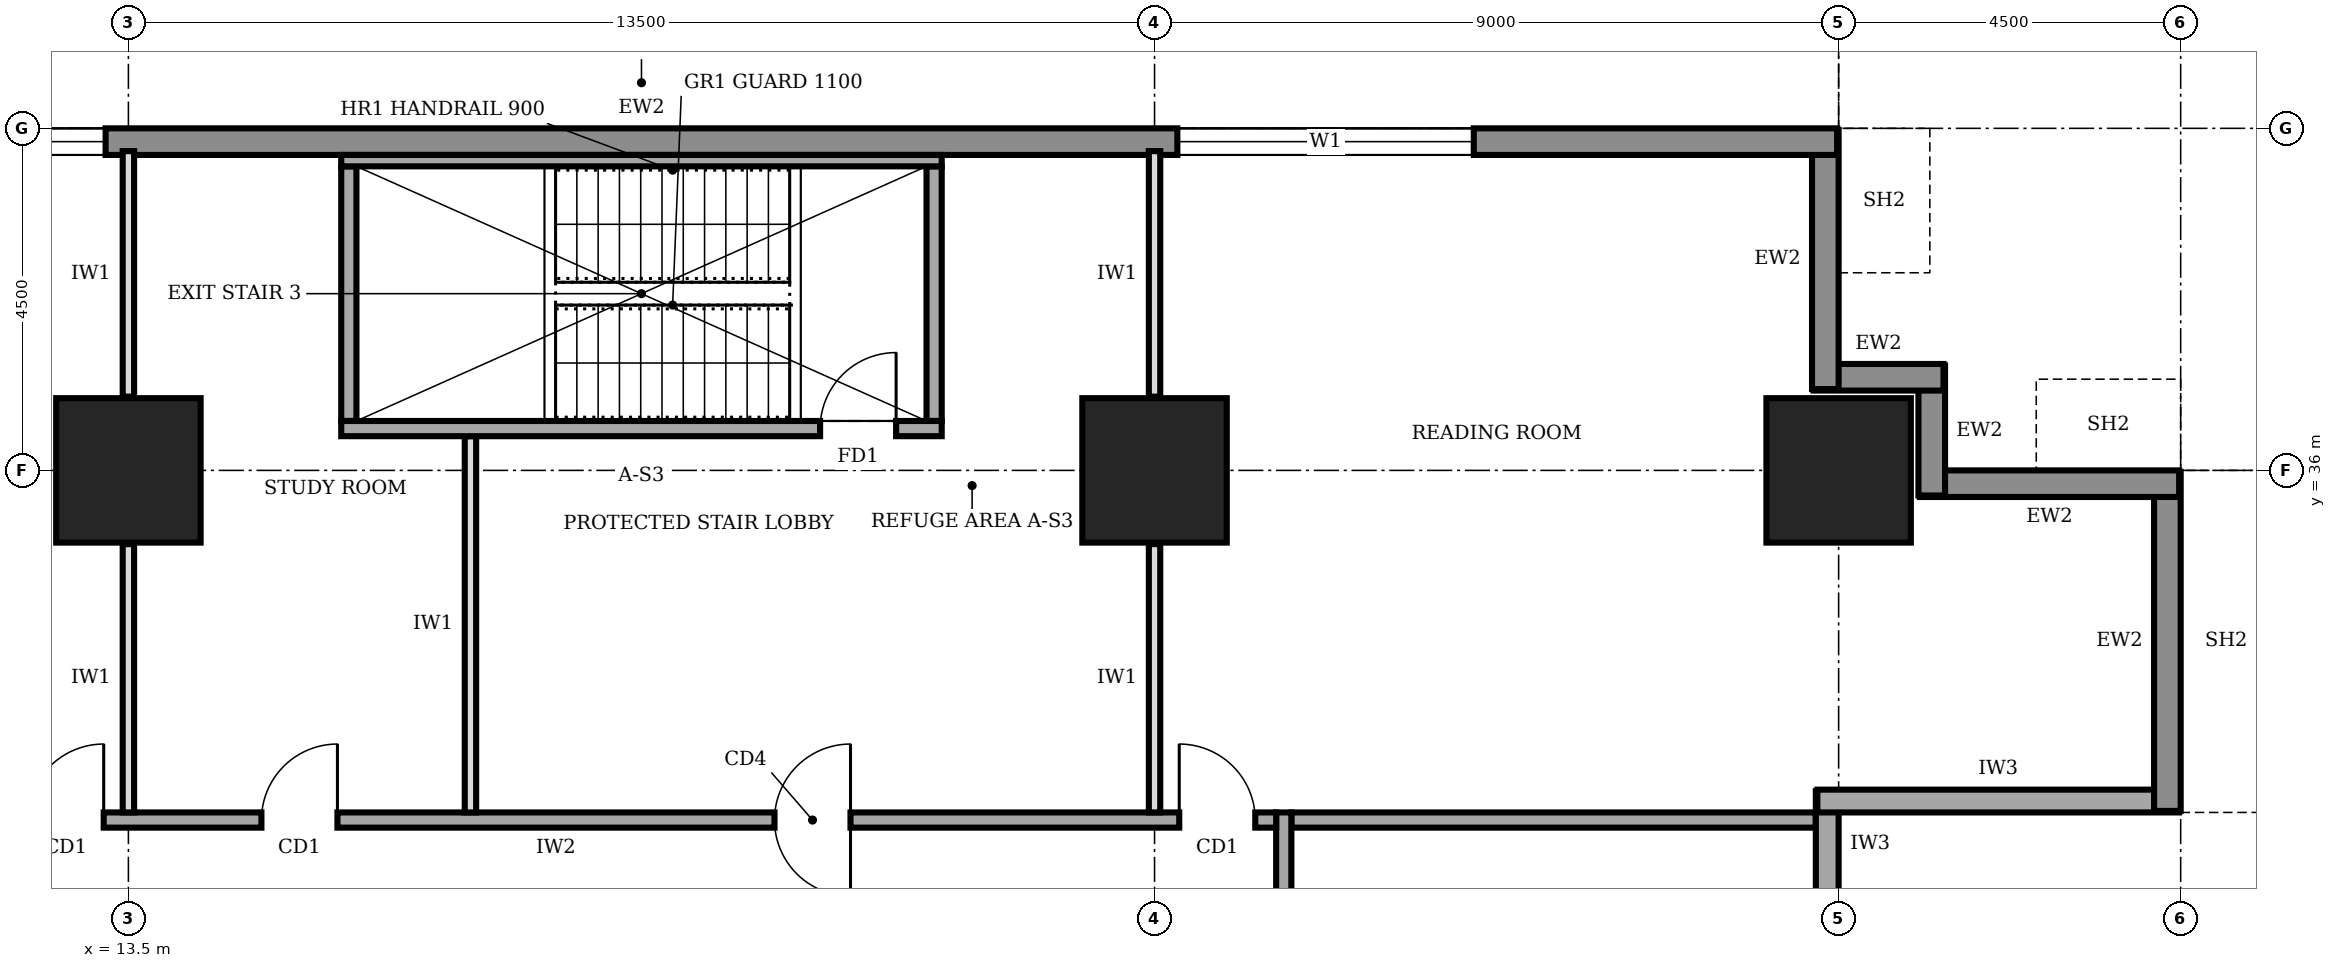
"""IFC4 building model, lengths in metres.
Left out: names, types, materials, properties, quantities, classifications, styles, units other than length and angle.
Written with IfcOpenShell. Run it as: python <this file> out.ifc"""

import sys

from ifc_helpers import new_model, si_unit, direction, frame, frame_2d, origin, origin_2d, place, context, subcontext, project, spatial, rectangle, extrude, element, fill, save


model = new_model("IFC4")
c1 = context("Model", 3, precision=1e-05, world=origin(), true_north=direction((0.0, 1.0)))
c2 = subcontext(c1, "Body", "Model", "MODEL_VIEW")
j1 = project(units=[si_unit("LENGTHUNIT", "METRE"), si_unit("PLANEANGLEUNIT", "RADIAN")], contexts=[c1])
p1 = place(None, origin())
s1 = spatial("IfcSite", under=j1, at=p1, CompositionType="ELEMENT")
p2 = place(p1, origin())
s2 = spatial("IfcBuilding", under=s1, at=p2, CompositionType="ELEMENT")
p3 = place(p2, frame((0.0, 0.0, 129.0)))
s3 = spatial("IfcBuildingStorey", under=s2, at=p3, CompositionType="ELEMENT", Elevation=129.0)
for number, where, z_axis, x_axis in (
    (1, (13.5, 36.0, 0.0), (0.0, 0.0, 1.0), (1.0, 0.0, 0.0)),
    (2, (27.0, 36.0, 0.0), (0.0, 0.0, 1.0), (1.0, 0.0, 0.0)),
    (3, (36.0, 36.0, 0.0), (0.0, 0.0, 1.0), (1.0, 0.0, 0.0)),
):
    element("IfcColumn", number, at=place(p3, frame(where, z_axis=z_axis, x_axis=x_axis)), inside=s3, PredefinedType="COLUMN", context=c2, shape_type="SweptSolid", body=[
        extrude(rectangle(XDim=1.9, YDim=1.9, at=origin_2d()), origin(), (0.0, 0.0, 1.0), 4.0),
    ])
p4 = place(p3, frame((35.85, 30.4, 0.0), z_axis=(0.0, 0.0, 1.0), x_axis=(0.0, 1.0, 0.0)))
e4 = element("IfcWall", 4, at=p4, inside=s3, PredefinedType="SOLIDWALL", context=c2, shape_type="SweptSolid", body=[
    extrude(rectangle(XDim=1.38, YDim=0.3, at=frame_2d((0.69, 0.0))), origin(), (0.0, 0.0, 1.0), 2.65),
])
p5 = place(p3, frame((35.72, 31.65, 0.0), z_axis=(0.0, 0.0, 1.0), x_axis=(1.0, 0.0, 0.0)))
e5 = element("IfcWall", 5, at=p5, inside=s3, PredefinedType="SOLIDWALL", context=c2, shape_type="SweptSolid", body=[
    extrude(rectangle(XDim=4.76, YDim=0.3, at=frame_2d((2.38, 0.0))), origin(), (0.0, 0.0, 1.0), 3.75),
])
p6 = place(p3, frame((40.325, 31.52, 0.0), z_axis=(0.0, 0.0, 1.0), x_axis=(0.0, 1.0, 0.0)))
e6 = element("IfcWall", 6, at=p6, inside=s3, PredefinedType="STANDARD", context=c2, shape_type="SweptSolid", body=[
    extrude(rectangle(XDim=4.46, YDim=0.35, at=frame_2d((2.23, 0.0))), origin(), (0.0, 0.0, 1.0), 3.75),
])
p7 = place(p3, frame((40.48, 35.825, 0.0), z_axis=(0.0, 0.0, 1.0), x_axis=(-1.0, 0.0, 0.0)))
e7 = element("IfcWall", 7, at=p7, inside=s3, PredefinedType="STANDARD", context=c2, shape_type="SweptSolid", body=[
    extrude(rectangle(XDim=3.41, YDim=0.35, at=frame_2d((1.705, 0.0))), origin(), (0.0, 0.0, 1.0), 2.85),
])
for number, where, z_axis, x_axis in (
    (8, (37.225, 35.67, 0.0), (0.0, 0.0, 1.0), (0.0, 1.0, 0.0)),
    (9, (37.38, 37.225, 0.0), (0.0, 0.0, 1.0), (-1.0, 0.0, 0.0)),
):
    element("IfcWall", number, at=place(p3, frame(where, z_axis=z_axis, x_axis=x_axis)), inside=s3, PredefinedType="STANDARD", context=c2, shape_type="SweptSolid", body=[
        extrude(rectangle(XDim=1.71, YDim=0.35, at=frame_2d((0.855, 0.0))), origin(), (0.0, 0.0, 1.0), 3.75),
    ])
p8 = place(p3, frame((35.825, 37.07, 0.0), z_axis=(0.0, 0.0, 1.0), x_axis=(0.0, 1.0, 0.0)))
e10 = element("IfcWall", 10, at=p8, inside=s3, PredefinedType="STANDARD", context=c2, shape_type="SweptSolid", body=[
    extrude(rectangle(XDim=3.41, YDim=0.35, at=frame_2d((1.705, 0.0))), origin(), (0.0, 0.0, 1.0), 2.85),
])
p9 = place(p3, frame((35.98, 40.325, 0.0), z_axis=(0.0, 0.0, 1.0), x_axis=(-1.0, 0.0, 0.0)))
e11 = element("IfcWall", 11, at=p9, inside=s3, PredefinedType="STANDARD", context=c2, shape_type="SweptSolid", body=[
    extrude(rectangle(XDim=31.46, YDim=0.35, at=frame_2d((15.73, 0.0))), origin(), (0.0, 0.0, 1.0), 3.75),
])
p10 = place(p9, frame((27.21, 0.0, 0.9)))
e12 = element("IfcOpeningElement", 12, at=p10, cuts=e11, PredefinedType="OPENING", context=c2, shape_type="SweptSolid", body=[
    extrude(rectangle(XDim=3.9, YDim=2.2, at=frame_2d((1.95, 1.1))), frame((0.0, 0.185, 0.0), z_axis=(0.0, -1.0, 0.0), x_axis=(1.0, 0.0, 0.0)), (0.0, 0.0, 1.0), 0.37),
])
p11 = place(p9, frame((22.78, 0.0, 0.9)))
e13 = element("IfcOpeningElement", 13, at=p11, cuts=e11, PredefinedType="OPENING", context=c2, shape_type="SweptSolid", body=[
    extrude(rectangle(XDim=3.9, YDim=2.2, at=frame_2d((1.95, 1.1))), frame((0.0, 0.185, 0.0), z_axis=(0.0, -1.0, 0.0), x_axis=(1.0, 0.0, 0.0)), (0.0, 0.0, 1.0), 0.37),
])
p12 = place(p9, frame((4.78, 0.0, 0.9)))
e14 = element("IfcOpeningElement", 14, at=p12, cuts=e11, PredefinedType="OPENING", context=c2, shape_type="SweptSolid", body=[
    extrude(rectangle(XDim=3.9, YDim=2.2, at=frame_2d((1.95, 1.1))), frame((0.0, 0.185, 0.0), z_axis=(0.0, -1.0, 0.0), x_axis=(1.0, 0.0, 0.0)), (0.0, 0.0, 1.0), 0.37),
])
p13 = place(p3, frame((28.7, 7.7, 0.0), z_axis=(0.0, 0.0, 1.0), x_axis=(0.0, 1.0, 0.0)))
e15 = element("IfcWall", 15, at=p13, inside=s3, PredefinedType="SOLIDWALL", context=c2, shape_type="SweptSolid", body=[
    extrude(rectangle(XDim=23.8, YDim=0.2, at=frame_2d((11.9, 0.0))), origin(), (0.0, 0.0, 1.0), 3.75),
])
p14 = place(p13, frame((10.9, 0.0, 0.0)))
e16 = element("IfcOpeningElement", 16, at=p14, cuts=e15, PredefinedType="OPENING", context=c2, shape_type="SweptSolid", body=[
    extrude(rectangle(XDim=1.8, YDim=2.1, at=frame_2d((0.9, 1.05))), frame((0.0, 0.11, 0.0), z_axis=(0.0, -1.0, 0.0), x_axis=(1.0, 0.0, 0.0)), (0.0, 0.0, 1.0), 0.22),
])
p15 = place(p3, frame((28.6, 31.4, 0.0), z_axis=(0.0, 0.0, 1.0), x_axis=(-1.0, 0.0, 0.0)))
e17 = element("IfcWall", 17, at=p15, inside=s3, PredefinedType="SOLIDWALL", context=c2, shape_type="SweptSolid", body=[
    extrude(rectangle(XDim=16.9, YDim=0.2, at=frame_2d((8.45, 0.0))), origin(), (0.0, 0.0, 1.0), 3.75),
])
p16 = place(p15, frame((15.425, 0.0, 0.0)))
e18 = element("IfcOpeningElement", 18, at=p16, cuts=e17, PredefinedType="OPENING", context=c2, shape_type="SweptSolid", body=[
    extrude(rectangle(XDim=1.0, YDim=2.1, at=frame_2d((0.5, 1.05))), frame((0.0, 0.11, 0.0), z_axis=(0.0, -1.0, 0.0), x_axis=(1.0, 0.0, 0.0)), (0.0, 0.0, 1.0), 0.22),
])
p17 = place(p15, frame((12.35, 0.0, 0.0)))
e19 = element("IfcOpeningElement", 19, at=p17, cuts=e17, PredefinedType="OPENING", context=c2, shape_type="SweptSolid", body=[
    extrude(rectangle(XDim=1.0, YDim=2.1, at=frame_2d((0.5, 1.05))), frame((0.0, 0.11, 0.0), z_axis=(0.0, -1.0, 0.0), x_axis=(1.0, 0.0, 0.0)), (0.0, 0.0, 1.0), 0.22),
])
p18 = place(p15, frame((5.6, 0.0, 0.0)))
e20 = element("IfcOpeningElement", 20, at=p18, cuts=e17, PredefinedType="OPENING", context=c2, shape_type="SweptSolid", body=[
    extrude(rectangle(XDim=1.0, YDim=2.1, at=frame_2d((0.5, 1.05))), frame((0.0, 0.11, 0.0), z_axis=(0.0, -1.0, 0.0), x_axis=(1.0, 0.0, 0.0)), (0.0, 0.0, 1.0), 0.22),
])
p19 = place(p15, frame((0.275, 0.0, 0.0)))
e21 = element("IfcOpeningElement", 21, at=p19, cuts=e17, PredefinedType="OPENING", context=c2, shape_type="SweptSolid", body=[
    extrude(rectangle(XDim=1.0, YDim=2.1, at=frame_2d((0.5, 1.05))), frame((0.0, 0.11, 0.0), z_axis=(0.0, -1.0, 0.0), x_axis=(1.0, 0.0, 0.0)), (0.0, 0.0, 1.0), 0.22),
])
p20 = place(p3, frame((28.8, 31.4, 0.0), z_axis=(0.0, 0.0, 1.0), x_axis=(1.0, 0.0, 0.0)))
e22 = element("IfcWall", 22, at=p20, inside=s3, PredefinedType="SOLIDWALL", context=c2, shape_type="SweptSolid", body=[
    extrude(rectangle(XDim=6.9, YDim=0.2, at=frame_2d((3.45, 0.0))), origin(), (0.0, 0.0, 1.0), 3.75),
])
p21 = place(p3, frame((13.5, 31.5, 0.0), z_axis=(0.0, 0.0, 1.0), x_axis=(0.0, 1.0, 0.0)))
e23 = element("IfcWall", 23, at=p21, inside=s3, PredefinedType="PARTITIONING", context=c2, shape_type="SweptSolid", body=[
    extrude(rectangle(XDim=3.53, YDim=0.15, at=frame_2d((1.765, 0.0))), origin(), (0.0, 0.0, 1.0), 2.85),
])
p22 = place(p3, frame((13.5, 36.97, 0.0), z_axis=(0.0, 0.0, 1.0), x_axis=(0.0, 1.0, 0.0)))
e24 = element("IfcWall", 24, at=p22, inside=s3, PredefinedType="PARTITIONING", context=c2, shape_type="SweptSolid", body=[
    extrude(rectangle(XDim=3.23, YDim=0.15, at=frame_2d((1.615, 0.0))), origin(), (0.0, 0.0, 1.0), 2.85),
])
p23 = place(p3, frame((18.0, 31.5, 0.0), z_axis=(0.0, 0.0, 1.0), x_axis=(0.0, 1.0, 0.0)))
e25 = element("IfcWall", 25, at=p23, inside=s3, PredefinedType="PARTITIONING", context=c2, shape_type="SweptSolid", body=[
    extrude(rectangle(XDim=4.95, YDim=0.15, at=frame_2d((2.475, 0.0))), origin(), (0.0, 0.0, 1.0), 3.75),
])
p24 = place(p3, frame((27.0, 31.5, 0.0), z_axis=(0.0, 0.0, 1.0), x_axis=(0.0, 1.0, 0.0)))
e26 = element("IfcWall", 26, at=p24, inside=s3, PredefinedType="PARTITIONING", context=c2, shape_type="SweptSolid", body=[
    extrude(rectangle(XDim=3.53, YDim=0.15, at=frame_2d((1.765, 0.0))), origin(), (0.0, 0.0, 1.0), 2.85),
])
p25 = place(p3, frame((27.0, 36.97, 0.0), z_axis=(0.0, 0.0, 1.0), x_axis=(0.0, 1.0, 0.0)))
e27 = element("IfcWall", 27, at=p25, inside=s3, PredefinedType="PARTITIONING", context=c2, shape_type="SweptSolid", body=[
    extrude(rectangle(XDim=3.23, YDim=0.15, at=frame_2d((1.615, 0.0))), origin(), (0.0, 0.0, 1.0), 2.85),
])
p26 = place(p3, frame((16.3, 36.55, 0.0), z_axis=(0.0, 0.0, 1.0), x_axis=(1.0, 0.0, 0.0)))
e28 = element("IfcWall", 28, at=p26, inside=s3, PredefinedType="SOLIDWALL", context=c2, shape_type="SweptSolid", body=[
    extrude(rectangle(XDim=7.9, YDim=0.2, at=frame_2d((3.95, 0.0))), origin(), (0.0, 0.0, 1.0), 3.75),
])
p27 = place(p26, frame((6.3, 0.0, 0.0)))
e29 = element("IfcOpeningElement", 29, at=p27, cuts=e28, PredefinedType="OPENING", context=c2, shape_type="SweptSolid", body=[
    extrude(rectangle(XDim=1.0, YDim=2.1, at=frame_2d((0.5, 1.05))), frame((0.0, 0.11, 0.0), z_axis=(0.0, -1.0, 0.0), x_axis=(1.0, 0.0, 0.0)), (0.0, 0.0, 1.0), 0.22),
])
p28 = place(p3, frame((16.3, 40.075, 0.0), z_axis=(0.0, 0.0, 1.0), x_axis=(1.0, 0.0, 0.0)))
e30 = element("IfcWall", 30, at=p28, inside=s3, PredefinedType="SOLIDWALL", context=c2, shape_type="SweptSolid", body=[
    extrude(rectangle(XDim=7.9, YDim=0.15, at=frame_2d((3.95, 0.0))), origin(), (0.0, 0.0, 1.0), 3.75),
])
for number, where, z_axis, x_axis in (
    (31, (16.4, 36.65, 0.0), (0.0, 0.0, 1.0), (0.0, 1.0, 0.0)),
    (32, (24.1, 36.65, 0.0), (0.0, 0.0, 1.0), (0.0, 1.0, 0.0)),
):
    element("IfcWall", number, at=place(p3, frame(where, z_axis=z_axis, x_axis=x_axis)), inside=s3, PredefinedType="SOLIDWALL", context=c2, shape_type="SweptSolid", body=[
        extrude(rectangle(XDim=3.35, YDim=0.2, at=frame_2d((1.675, 0.0))), origin(), (0.0, 0.0, 1.0), 3.75),
    ])
p29 = place(p11, origin())
e33 = element("IfcWindow", 33, at=p29, inside=s3, PartitioningType="SINGLE_PANEL", PredefinedType="WINDOW", context=c2, shape_type="SweptSolid", body=[
    extrude(rectangle(XDim=3.9, YDim=2.2, at=frame_2d((1.95, 1.1))), frame((0.0, 0.03, 0.0), z_axis=(0.0, -1.0, 0.0), x_axis=(1.0, 0.0, 0.0)), (0.0, 0.0, 1.0), 0.06),
])
fill(e13, e33)
p30 = place(p12, origin())
e34 = element("IfcWindow", 34, at=p30, inside=s3, PartitioningType="SINGLE_PANEL", PredefinedType="WINDOW", context=c2, shape_type="SweptSolid", body=[
    extrude(rectangle(XDim=3.9, YDim=2.2, at=frame_2d((1.95, 1.1))), frame((0.0, 0.03, 0.0), z_axis=(0.0, -1.0, 0.0), x_axis=(1.0, 0.0, 0.0)), (0.0, 0.0, 1.0), 0.06),
])
fill(e14, e34)
p31 = place(p16, frame((1.0, 0.0, 0.0), z_axis=(0.0, 0.0, 1.0), x_axis=(-1.0, 0.0, 0.0)))
e35 = element("IfcDoor", 35, at=p31, inside=s3, OperationType="SINGLE_SWING_RIGHT", PredefinedType="DOOR", context=c2, shape_type="SweptSolid", body=[
    extrude(rectangle(XDim=1.0, YDim=2.1, at=frame_2d((0.5, 1.05))), frame((0.0, 0.025, 0.0), z_axis=(0.0, -1.0, 0.0), x_axis=(1.0, 0.0, 0.0)), (0.0, 0.0, 1.0), 0.05),
])
fill(e18, e35)
p32 = place(p17, frame((1.0, 0.0, 0.0), z_axis=(0.0, 0.0, 1.0), x_axis=(-1.0, 0.0, 0.0)))
e36 = element("IfcDoor", 36, at=p32, inside=s3, OperationType="SINGLE_SWING_RIGHT", PredefinedType="DOOR", context=c2, shape_type="SweptSolid", body=[
    extrude(rectangle(XDim=1.0, YDim=2.1, at=frame_2d((0.5, 1.05))), frame((0.0, 0.025, 0.0), z_axis=(0.0, -1.0, 0.0), x_axis=(1.0, 0.0, 0.0)), (0.0, 0.0, 1.0), 0.05),
])
fill(e19, e36)
p33 = place(p18, origin())
e37 = element("IfcDoor", 37, at=p33, inside=s3, OperationType="DOUBLE_SWING_LEFT", PredefinedType="DOOR", context=c2, shape_type="SweptSolid", body=[
    extrude(rectangle(XDim=1.0, YDim=2.1, at=frame_2d((0.5, 1.05))), frame((0.0, 0.025, 0.0), z_axis=(0.0, -1.0, 0.0), x_axis=(1.0, 0.0, 0.0)), (0.0, 0.0, 1.0), 0.05),
])
fill(e20, e37)
p34 = place(p19, frame((1.0, 0.0, 0.0), z_axis=(0.0, 0.0, 1.0), x_axis=(-1.0, 0.0, 0.0)))
e38 = element("IfcDoor", 38, at=p34, inside=s3, OperationType="SINGLE_SWING_LEFT", PredefinedType="DOOR", context=c2, shape_type="SweptSolid", body=[
    extrude(rectangle(XDim=1.0, YDim=2.1, at=frame_2d((0.5, 1.05))), frame((0.0, 0.025, 0.0), z_axis=(0.0, -1.0, 0.0), x_axis=(1.0, 0.0, 0.0)), (0.0, 0.0, 1.0), 0.05),
])
fill(e21, e38)
p35 = place(p27, origin())
e39 = element("IfcDoor", 39, at=p35, inside=s3, OperationType="SINGLE_SWING_RIGHT", PredefinedType="DOOR", context=c2, shape_type="SweptSolid", body=[
    extrude(rectangle(XDim=1.0, YDim=2.1, at=frame_2d((0.5, 1.05))), frame((0.0, 0.025, 0.0), z_axis=(0.0, -1.0, 0.0), x_axis=(1.0, 0.0, 0.0)), (0.0, 0.0, 1.0), 0.05),
])
fill(e29, e39)
save(model, sys.argv[1])
